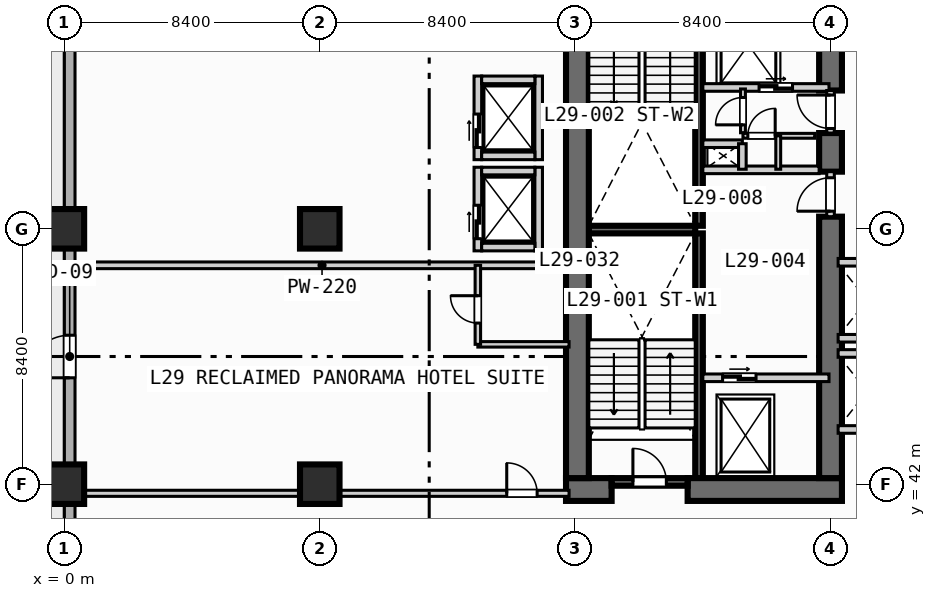
"""IFC4 building model, lengths in metres.
Left out: names, types, materials, properties, quantities, classifications, styles, units other than length and angle.
Written with IfcOpenShell. Run it as: python <this file> out.ifc"""

import sys

from ifc_helpers import new_model, si_unit, direction, frame, frame_2d, origin, origin_2d, place, context, subcontext, project, spatial, rectangle, extrude, element, fill, save


model = new_model("IFC4")
c1 = context("Model", 3, precision=1e-05, world=origin(), true_north=direction((0.0, 1.0)))
c2 = subcontext(c1, "Body", "Model", "MODEL_VIEW")
j1 = project(units=[si_unit("LENGTHUNIT", "METRE"), si_unit("PLANEANGLEUNIT", "RADIAN")], contexts=[c1])
p1 = place(None, origin())
s1 = spatial("IfcSite", under=j1, at=p1, CompositionType="ELEMENT")
p2 = place(p1, origin())
s2 = spatial("IfcBuilding", under=s1, at=p2, CompositionType="ELEMENT")
p3 = place(p2, frame((0.0, 0.0, 122.8)))
s3 = spatial("IfcBuildingStorey", under=s2, at=p3, CompositionType="ELEMENT", Elevation=122.8)
for number, where, z_axis, x_axis in (
    (1, (20.875, 42.2, 0.0), (0.0, 0.0, 1.0), (0.0, 1.0, 0.0)),
    (2, (20.875, 50.5, 0.0), (0.0, 0.0, 1.0), (0.0, 1.0, 0.0)),
):
    element("IfcWall", number, at=place(p3, frame(where, z_axis=z_axis, x_axis=x_axis)), inside=s3, PredefinedType="SOLIDWALL", context=c2, shape_type="SweptSolid", body=[
        extrude(rectangle(XDim=8.05, YDim=0.25, at=frame_2d((4.025, 0.0))), origin(), (0.0, 0.0, 1.0), 3.55),
    ])
p4 = place(p3, frame((17.25, 50.375, 0.0), z_axis=(0.0, 0.0, 1.0), x_axis=(1.0, 0.0, 0.0)))
e3 = element("IfcWall", 3, at=p4, inside=s3, PredefinedType="SOLIDWALL", context=c2, shape_type="SweptSolid", body=[
    extrude(rectangle(XDim=3.5, YDim=0.25, at=frame_2d((1.75, 0.0))), origin(), (0.0, 0.0, 1.0), 3.55),
])
p5 = place(p3, frame((16.5, 41.825, 0.0), z_axis=(0.0, 0.0, 1.0), x_axis=(1.0, 0.0, 0.0)))
e4 = element("IfcWall", 4, at=p5, inside=s3, PredefinedType="SHEAR", context=c2, shape_type="SweptSolid", body=[
    extrude(rectangle(XDim=1.5, YDim=0.75, at=frame_2d((0.75, 0.0))), origin(), (0.0, 0.0, 1.0), 3.55),
])
p6 = place(p3, frame((20.5, 41.825, 0.0), z_axis=(0.0, 0.0, 1.0), x_axis=(1.0, 0.0, 0.0)))
e5 = element("IfcWall", 5, at=p6, inside=s3, PredefinedType="SHEAR", context=c2, shape_type="SweptSolid", body=[
    extrude(rectangle(XDim=5.075, YDim=0.75, at=frame_2d((2.538, 0.0))), origin(), (0.0, 0.0, 1.0), 3.55),
])
p7 = place(p3, frame((16.875, 42.2, 0.0), z_axis=(0.0, 0.0, 1.0), x_axis=(0.0, 1.0, 0.0)))
e6 = element("IfcWall", 6, at=p7, inside=s3, PredefinedType="SHEAR", context=c2, shape_type="SweptSolid", body=[
    extrude(rectangle(XDim=16.35, YDim=0.75, at=frame_2d((8.175, 0.0))), origin(), (0.0, 0.0, 1.0), 3.55),
])
p8 = place(p3, frame((25.2, 42.2, 0.0), z_axis=(0.0, 0.0, 1.0), x_axis=(0.0, 1.0, 0.0)))
e7 = element("IfcWall", 7, at=p8, inside=s3, PredefinedType="SHEAR", context=c2, shape_type="SweptSolid", body=[
    extrude(rectangle(XDim=8.6, YDim=0.75, at=frame_2d((4.3, 0.0))), origin(), (0.0, 0.0, 1.0), 3.55),
])
p9 = place(p3, frame((25.2, 52.28, 0.0), z_axis=(0.0, 0.0, 1.0), x_axis=(0.0, 1.0, 0.0)))
e8 = element("IfcWall", 8, at=p9, inside=s3, PredefinedType="SHEAR", context=c2, shape_type="SweptSolid", body=[
    extrude(rectangle(XDim=1.27, YDim=0.75, at=frame_2d((0.635, 0.0))), origin(), (0.0, 0.0, 1.0), 3.55),
])
p10 = place(p3, frame((25.2, 54.95, 0.0), z_axis=(0.0, 0.0, 1.0), x_axis=(0.0, 1.0, 0.0)))
e9 = element("IfcWall", 9, at=p10, inside=s3, PredefinedType="SHEAR", context=c2, shape_type="SweptSolid", body=[
    extrude(rectangle(XDim=3.6, YDim=0.75, at=frame_2d((1.8, 0.0))), origin(), (0.0, 0.0, 1.0), 3.55),
])
for number, where, z_axis, x_axis in (
    (10, (0.0, 42.0, 0.0), (0.0, 0.0, 1.0), (1.0, 0.0, 0.0)),
    (11, (0.0, 50.4, 0.0), (0.0, 0.0, 1.0), (1.0, 0.0, 0.0)),
    (12, (8.4, 42.0, 0.0), (0.0, 0.0, 1.0), (1.0, 0.0, 0.0)),
    (13, (8.4, 50.4, 0.0), (0.0, 0.0, 1.0), (1.0, 0.0, 0.0)),
):
    element("IfcColumn", number, at=place(p3, frame(where, z_axis=z_axis, x_axis=x_axis)), inside=s3, PredefinedType="COLUMN", context=c2, shape_type="SweptSolid", body=[
        extrude(rectangle(XDim=1.3, YDim=1.3, at=origin_2d()), origin(), (0.0, 0.0, 1.0), 3.8),
    ])
p11 = place(p3, frame((0.175, 3.175, 0.0), z_axis=(0.0, 0.0, 1.0), x_axis=(0.0, 1.0, 0.0)))
e14 = element("IfcWall", 14, at=p11, inside=s3, PredefinedType="STANDARD", context=c2, shape_type="SweptSolid", body=[
    extrude(rectangle(XDim=86.05, YDim=0.35, at=frame_2d((43.025, 0.0))), origin(), (0.0, 0.0, 1.0), 3.55),
])
p12 = place(p11, frame((42.325, 0.0, 0.0)))
e15 = element("IfcOpeningElement", 15, at=p12, cuts=e14, PredefinedType="OPENING", context=c2, shape_type="SweptSolid", body=[
    extrude(rectangle(XDim=1.4, YDim=2.2, at=frame_2d((0.7, 1.1))), frame((0.0, 0.185, 0.0), z_axis=(0.0, -1.0, 0.0), x_axis=(1.0, 0.0, 0.0)), (0.0, 0.0, 1.0), 0.37),
])
p13 = place(p11, frame((33.525, 0.0, 0.85)))
e16 = element("IfcOpeningElement", 16, at=p13, cuts=e14, PredefinedType="OPENING", context=c2, shape_type="SweptSolid", body=[
    extrude(rectangle(XDim=2.2, YDim=1.8, at=frame_2d((1.1, 0.9))), frame((0.0, 0.185, 0.0), z_axis=(0.0, -1.0, 0.0), x_axis=(1.0, 0.0, 0.0)), (0.0, 0.0, 1.0), 0.37),
])
p14 = place(p11, frame((58.725, 0.0, 0.85)))
e17 = element("IfcOpeningElement", 17, at=p14, cuts=e14, PredefinedType="OPENING", context=c2, shape_type="SweptSolid", body=[
    extrude(rectangle(XDim=2.2, YDim=1.8, at=frame_2d((1.1, 0.9))), frame((0.0, 0.185, 0.0), z_axis=(0.0, -1.0, 0.0), x_axis=(1.0, 0.0, 0.0)), (0.0, 0.0, 1.0), 0.37),
])
p15 = place(p11, frame((65.125, 0.0, 0.85)))
e18 = element("IfcOpeningElement", 18, at=p15, cuts=e14, PredefinedType="OPENING", context=c2, shape_type="SweptSolid", body=[
    extrude(rectangle(XDim=1.8, YDim=1.8, at=frame_2d((0.9, 0.9))), frame((0.0, 0.185, 0.0), z_axis=(0.0, -1.0, 0.0), x_axis=(1.0, 0.0, 0.0)), (0.0, 0.0, 1.0), 0.37),
])
p16 = place(p11, frame((73.275, 0.0, 0.85)))
e19 = element("IfcOpeningElement", 19, at=p16, cuts=e14, PredefinedType="OPENING", context=c2, shape_type="SweptSolid", body=[
    extrude(rectangle(XDim=1.8, YDim=1.8, at=frame_2d((0.9, 0.9))), frame((0.0, 0.185, 0.0), z_axis=(0.0, -1.0, 0.0), x_axis=(1.0, 0.0, 0.0)), (0.0, 0.0, 1.0), 0.37),
])
p17 = place(p11, frame((81.625, 0.0, 0.85)))
e20 = element("IfcOpeningElement", 20, at=p17, cuts=e14, PredefinedType="OPENING", context=c2, shape_type="SweptSolid", body=[
    extrude(rectangle(XDim=1.8, YDim=1.8, at=frame_2d((0.9, 0.9))), frame((0.0, 0.185, 0.0), z_axis=(0.0, -1.0, 0.0), x_axis=(1.0, 0.0, 0.0)), (0.0, 0.0, 1.0), 0.37),
])
p18 = place(p3, frame((18.0, 42.075, 0.0), z_axis=(0.0, 0.0, 1.0), x_axis=(1.0, 0.0, 0.0)))
e21 = element("IfcWall", 21, at=p18, inside=s3, PredefinedType="SOLIDWALL", context=c2, shape_type="SweptSolid", body=[
    extrude(rectangle(XDim=2.5, YDim=0.25, at=frame_2d((1.25, 0.0))), origin(), (0.0, 0.0, 1.0), 3.55),
])
p19 = place(p18, frame((0.7, 0.0, 0.0)))
e22 = element("IfcOpeningElement", 22, at=p19, cuts=e21, PredefinedType="OPENING", context=c2, shape_type="SweptSolid", body=[
    extrude(rectangle(XDim=1.1, YDim=2.15, at=frame_2d((0.55, 1.075))), frame((0.0, 0.135, 0.0), z_axis=(0.0, -1.0, 0.0), x_axis=(1.0, 0.0, 0.0)), (0.0, 0.0, 1.0), 0.27),
])
p20 = place(p3, frame((21.0, 45.5, 0.0), z_axis=(0.0, 0.0, 1.0), x_axis=(1.0, 0.0, 0.0)))
e23 = element("IfcWall", 23, at=p20, inside=s3, PredefinedType="SOLIDWALL", context=c2, shape_type="SweptSolid", body=[
    extrude(rectangle(XDim=4.15, YDim=0.25, at=frame_2d((2.075, 0.0))), origin(), (0.0, 0.0, 1.0), 3.55),
])
p21 = place(p20, frame((0.65, 0.0, 0.0)))
e24 = element("IfcOpeningElement", 24, at=p21, cuts=e23, PredefinedType="OPENING", context=c2, shape_type="SweptSolid", body=[
    extrude(rectangle(XDim=1.1, YDim=2.15, at=frame_2d((0.55, 1.075))), frame((0.0, 0.135, 0.0), z_axis=(0.0, -1.0, 0.0), x_axis=(1.0, 0.0, 0.0)), (0.0, 0.0, 1.0), 0.27),
])
p22 = place(p3, frame((25.2, 50.8, 0.0), z_axis=(0.0, 0.0, 1.0), x_axis=(0.0, 1.0, 0.0)))
e25 = element("IfcWall", 25, at=p22, inside=s3, PredefinedType="SOLIDWALL", context=c2, shape_type="SweptSolid", body=[
    extrude(rectangle(XDim=1.48, YDim=0.25, at=frame_2d((0.74, 0.0))), origin(), (0.0, 0.0, 1.0), 3.55),
])
p23 = place(p22, frame((0.18, 0.0, 0.0)))
e26 = element("IfcOpeningElement", 26, at=p23, cuts=e25, PredefinedType="OPENING", context=c2, shape_type="SweptSolid", body=[
    extrude(rectangle(XDim=1.1, YDim=2.15, at=frame_2d((0.55, 1.075))), frame((0.0, 0.135, 0.0), z_axis=(0.0, -1.0, 0.0), x_axis=(1.0, 0.0, 0.0)), (0.0, 0.0, 1.0), 0.27),
])
p24 = place(p3, frame((21.0, 52.34, 0.0), z_axis=(0.0, 0.0, 1.0), x_axis=(1.0, 0.0, 0.0)))
e27 = element("IfcWall", 27, at=p24, inside=s3, PredefinedType="SOLIDWALL", context=c2, shape_type="SweptSolid", body=[
    extrude(rectangle(XDim=3.825, YDim=0.25, at=frame_2d((1.913, 0.0))), origin(), (0.0, 0.0, 1.0), 3.55),
])
p25 = place(p3, frame((21.0, 55.05, 0.0), z_axis=(0.0, 0.0, 1.0), x_axis=(1.0, 0.0, 0.0)))
e28 = element("IfcWall", 28, at=p25, inside=s3, PredefinedType="SOLIDWALL", context=c2, shape_type="SweptSolid", body=[
    extrude(rectangle(XDim=4.15, YDim=0.25, at=frame_2d((2.075, 0.0))), origin(), (0.0, 0.0, 1.0), 3.55),
])
p26 = place(p25, frame((1.85, 0.0, 0.0)))
e29 = element("IfcOpeningElement", 29, at=p26, cuts=e28, PredefinedType="OPENING", context=c2, shape_type="SweptSolid", body=[
    extrude(rectangle(XDim=1.1, YDim=2.15, at=frame_2d((0.55, 1.075))), frame((0.0, 0.135, 0.0), z_axis=(0.0, -1.0, 0.0), x_axis=(1.0, 0.0, 0.0)), (0.0, 0.0, 1.0), 0.27),
])
p27 = place(p3, frame((25.2, 53.55, 0.0), z_axis=(0.0, 0.0, 1.0), x_axis=(0.0, 1.0, 0.0)))
e30 = element("IfcWall", 30, at=p27, inside=s3, PredefinedType="SOLIDWALL", context=c2, shape_type="SweptSolid", body=[
    extrude(rectangle(XDim=1.4, YDim=0.25, at=frame_2d((0.7, 0.0))), origin(), (0.0, 0.0, 1.0), 3.55),
])
p28 = place(p27, frame((0.15, 0.0, 0.0)))
e31 = element("IfcOpeningElement", 31, at=p28, cuts=e30, PredefinedType="OPENING", context=c2, shape_type="SweptSolid", body=[
    extrude(rectangle(XDim=1.1, YDim=2.15, at=frame_2d((0.55, 1.075))), frame((0.0, 0.135, 0.0), z_axis=(0.0, -1.0, 0.0), x_axis=(1.0, 0.0, 0.0)), (0.0, 0.0, 1.0), 0.27),
])
p29 = place(p3, frame((21.0, 53.2, 0.0), z_axis=(0.0, 0.0, 1.0), x_axis=(1.0, 0.0, 0.0)))
e32 = element("IfcWall", 32, at=p29, inside=s3, PredefinedType="SOLIDWALL", context=c2, shape_type="SweptSolid", body=[
    extrude(rectangle(XDim=1.3, YDim=0.25, at=frame_2d((0.65, 0.0))), origin(), (0.0, 0.0, 1.0), 3.55),
])
p30 = place(p3, frame((22.3, 52.36, 0.0), z_axis=(0.0, 0.0, 1.0), x_axis=(0.0, 1.0, 0.0)))
e33 = element("IfcWall", 33, at=p30, inside=s3, PredefinedType="SOLIDWALL", context=c2, shape_type="SweptSolid", body=[
    extrude(rectangle(XDim=0.84, YDim=0.25, at=frame_2d((0.42, 0.0))), origin(), (0.0, 0.0, 1.0), 3.55),
])
p31 = place(p3, frame((22.32, 53.56, 0.0), z_axis=(0.0, 0.0, 1.0), x_axis=(0.0, 1.0, 0.0)))
e34 = element("IfcWall", 34, at=p31, inside=s3, PredefinedType="PARTITIONING", context=c2, shape_type="SweptSolid", body=[
    extrude(rectangle(XDim=1.44, YDim=0.16, at=frame_2d((0.72, 0.0))), origin(), (0.0, 0.0, 1.0), 3.55),
])
p32 = place(p31, frame((0.26, 0.0, 0.0)))
e35 = element("IfcOpeningElement", 35, at=p32, cuts=e34, PredefinedType="OPENING", context=c2, shape_type="SweptSolid", body=[
    extrude(rectangle(XDim=0.9, YDim=2.1, at=frame_2d((0.45, 1.05))), frame((0.0, 0.09, 0.0), z_axis=(0.0, -1.0, 0.0), x_axis=(1.0, 0.0, 0.0)), (0.0, 0.0, 1.0), 0.18),
])
p33 = place(p3, frame((22.32, 53.46, 0.0), z_axis=(0.0, 0.0, 1.0), x_axis=(1.0, 0.0, 0.0)))
e36 = element("IfcWall", 36, at=p33, inside=s3, PredefinedType="PARTITIONING", context=c2, shape_type="SweptSolid", body=[
    extrude(rectangle(XDim=2.36, YDim=0.16, at=frame_2d((1.18, 0.0))), origin(), (0.0, 0.0, 1.0), 3.55),
])
p34 = place(p33, frame((0.16, 0.0, 0.0)))
e37 = element("IfcOpeningElement", 37, at=p34, cuts=e36, PredefinedType="OPENING", context=c2, shape_type="SweptSolid", body=[
    extrude(rectangle(XDim=0.9, YDim=2.1, at=frame_2d((0.45, 1.05))), frame((0.0, 0.09, 0.0), z_axis=(0.0, -1.0, 0.0), x_axis=(1.0, 0.0, 0.0)), (0.0, 0.0, 1.0), 0.18),
])
p35 = place(p3, frame((23.48, 52.36, 0.0), z_axis=(0.0, 0.0, 1.0), x_axis=(0.0, 1.0, 0.0)))
e38 = element("IfcWall", 38, at=p35, inside=s3, PredefinedType="PARTITIONING", context=c2, shape_type="SweptSolid", body=[
    extrude(rectangle(XDim=1.1, YDim=0.16, at=frame_2d((0.55, 0.0))), origin(), (0.0, 0.0, 1.0), 3.55),
])
p36 = place(p3, frame((13.6, 49.675, 0.0), z_axis=(0.0, 0.0, 1.0), x_axis=(0.0, 1.0, 0.0)))
e39 = element("IfcWall", 39, at=p36, inside=s3, PredefinedType="SOLIDWALL", context=c2, shape_type="SweptSolid", body=[
    extrude(rectangle(XDim=2.75, YDim=0.25, at=frame_2d((1.375, 0.0))), origin(), (0.0, 0.0, 1.0), 3.55),
])
p37 = place(p36, frame((0.4, 0.0, 0.0)))
e40 = element("IfcOpeningElement", 40, at=p37, cuts=e39, PredefinedType="OPENING", context=c2, shape_type="SweptSolid", body=[
    extrude(rectangle(XDim=1.1, YDim=2.15, at=frame_2d((0.55, 1.075))), frame((0.0, 0.135, 0.0), z_axis=(0.0, -1.0, 0.0), x_axis=(1.0, 0.0, 0.0)), (0.0, 0.0, 1.0), 0.27),
])
p38 = place(p3, frame((15.6, 49.675, 0.0), z_axis=(0.0, 0.0, 1.0), x_axis=(0.0, 1.0, 0.0)))
e41 = element("IfcWall", 41, at=p38, inside=s3, PredefinedType="SOLIDWALL", context=c2, shape_type="SweptSolid", body=[
    extrude(rectangle(XDim=2.75, YDim=0.25, at=frame_2d((1.375, 0.0))), origin(), (0.0, 0.0, 1.0), 3.55),
])
for number, where, z_axis, x_axis in (
    (42, (13.725, 49.8, 0.0), (0.0, 0.0, 1.0), (1.0, 0.0, 0.0)),
    (43, (13.725, 52.3, 0.0), (0.0, 0.0, 1.0), (1.0, 0.0, 0.0)),
):
    element("IfcWall", number, at=place(p3, frame(where, z_axis=z_axis, x_axis=x_axis)), inside=s3, PredefinedType="SOLIDWALL", context=c2, shape_type="SweptSolid", body=[
        extrude(rectangle(XDim=1.75, YDim=0.25, at=frame_2d((0.875, 0.0))), origin(), (0.0, 0.0, 1.0), 3.55),
    ])
p39 = place(p3, frame((13.6, 52.675, 0.0), z_axis=(0.0, 0.0, 1.0), x_axis=(0.0, 1.0, 0.0)))
e44 = element("IfcWall", 44, at=p39, inside=s3, PredefinedType="SOLIDWALL", context=c2, shape_type="SweptSolid", body=[
    extrude(rectangle(XDim=2.75, YDim=0.25, at=frame_2d((1.375, 0.0))), origin(), (0.0, 0.0, 1.0), 3.55),
])
p40 = place(p39, frame((0.4, 0.0, 0.0)))
e45 = element("IfcOpeningElement", 45, at=p40, cuts=e44, PredefinedType="OPENING", context=c2, shape_type="SweptSolid", body=[
    extrude(rectangle(XDim=1.1, YDim=2.15, at=frame_2d((0.55, 1.075))), frame((0.0, 0.135, 0.0), z_axis=(0.0, -1.0, 0.0), x_axis=(1.0, 0.0, 0.0)), (0.0, 0.0, 1.0), 0.27),
])
p41 = place(p3, frame((15.6, 52.675, 0.0), z_axis=(0.0, 0.0, 1.0), x_axis=(0.0, 1.0, 0.0)))
e46 = element("IfcWall", 46, at=p41, inside=s3, PredefinedType="SOLIDWALL", context=c2, shape_type="SweptSolid", body=[
    extrude(rectangle(XDim=2.75, YDim=0.25, at=frame_2d((1.375, 0.0))), origin(), (0.0, 0.0, 1.0), 3.55),
])
for number, where, z_axis, x_axis in (
    (47, (13.725, 52.8, 0.0), (0.0, 0.0, 1.0), (1.0, 0.0, 0.0)),
    (48, (13.725, 55.3, 0.0), (0.0, 0.0, 1.0), (1.0, 0.0, 0.0)),
):
    element("IfcWall", number, at=place(p3, frame(where, z_axis=z_axis, x_axis=x_axis)), inside=s3, PredefinedType="SOLIDWALL", context=c2, shape_type="SweptSolid", body=[
        extrude(rectangle(XDim=1.75, YDim=0.25, at=frame_2d((0.875, 0.0))), origin(), (0.0, 0.0, 1.0), 3.55),
    ])
for number, where, z_axis, x_axis in (
    (49, (25.45, 43.8, 0.0), (0.0, 0.0, 1.0), (1.0, 0.0, 0.0)),
    (50, (25.45, 46.3, 0.0), (0.0, 0.0, 1.0), (1.0, 0.0, 0.0)),
    (51, (25.45, 46.8, 0.0), (0.0, 0.0, 1.0), (1.0, 0.0, 0.0)),
    (52, (25.45, 49.3, 0.0), (0.0, 0.0, 1.0), (1.0, 0.0, 0.0)),
):
    element("IfcWall", number, at=place(p3, frame(where, z_axis=z_axis, x_axis=x_axis)), inside=s3, PredefinedType="SOLIDWALL", context=c2, shape_type="SweptSolid", body=[
        extrude(rectangle(XDim=1.825, YDim=0.25, at=frame_2d((0.913, 0.0))), origin(), (0.0, 0.0, 1.0), 3.55),
    ])
p42 = place(p3, frame((0.35, 41.7, 0.0), z_axis=(0.0, 0.0, 1.0), x_axis=(1.0, 0.0, 0.0)))
e53 = element("IfcWall", 53, at=p42, inside=s3, PredefinedType="PARTITIONING", context=c2, shape_type="SweptSolid", body=[
    extrude(rectangle(XDim=16.25, YDim=0.2, at=frame_2d((8.125, 0.0))), origin(), (0.0, 0.0, 1.0), 2.8),
])
p43 = place(p42, frame((14.2, 0.0, 0.0)))
e54 = element("IfcOpeningElement", 54, at=p43, cuts=e53, PredefinedType="OPENING", context=c2, shape_type="SweptSolid", body=[
    extrude(rectangle(XDim=1.0, YDim=2.15, at=frame_2d((0.5, 1.075))), frame((0.0, 0.11, 0.0), z_axis=(0.0, -1.0, 0.0), x_axis=(1.0, 0.0, 0.0)), (0.0, 0.0, 1.0), 0.22),
])
p44 = place(p3, frame((0.35, 49.2, 0.0), z_axis=(0.0, 0.0, 1.0), x_axis=(1.0, 0.0, 0.0)))
e55 = element("IfcWall", 55, at=p44, inside=s3, PredefinedType="PARTITIONING", context=c2, shape_type="SweptSolid", body=[
    extrude(rectangle(XDim=16.25, YDim=0.22, at=frame_2d((8.125, 0.0))), origin(), (0.0, 0.0, 1.0), 3.55),
])
p45 = place(p3, frame((13.6, 46.6, 0.0), z_axis=(0.0, 0.0, 1.0), x_axis=(1.0, 0.0, 0.0)))
e56 = element("IfcWall", 56, at=p45, inside=s3, PredefinedType="PLUMBINGWALL", context=c2, shape_type="SweptSolid", body=[
    extrude(rectangle(XDim=3.0, YDim=0.18, at=frame_2d((1.5, 0.0))), origin(), (0.0, 0.0, 1.0), 3.55),
])
p46 = place(p3, frame((13.6, 46.6, 0.0), z_axis=(0.0, 0.0, 1.0), x_axis=(0.0, 1.0, 0.0)))
e57 = element("IfcWall", 57, at=p46, inside=s3, PredefinedType="PLUMBINGWALL", context=c2, shape_type="SweptSolid", body=[
    extrude(rectangle(XDim=2.6, YDim=0.18, at=frame_2d((1.3, 0.0))), origin(), (0.0, 0.0, 1.0), 3.55),
])
p47 = place(p46, frame((0.7, 0.0, 0.0)))
e58 = element("IfcOpeningElement", 58, at=p47, cuts=e57, PredefinedType="OPENING", context=c2, shape_type="SweptSolid", body=[
    extrude(rectangle(XDim=0.9, YDim=2.1, at=frame_2d((0.45, 1.05))), frame((0.0, 0.1, 0.0), z_axis=(0.0, -1.0, 0.0), x_axis=(1.0, 0.0, 0.0)), (0.0, 0.0, 1.0), 0.2),
])
p48 = place(p12, origin())
e59 = element("IfcDoor", 59, at=p48, inside=s3, OperationType="SINGLE_SWING_LEFT", PredefinedType="DOOR", context=c2, shape_type="SweptSolid", body=[
    extrude(rectangle(XDim=1.4, YDim=2.2, at=frame_2d((0.7, 1.1))), frame((0.0, 0.025, 0.0), z_axis=(0.0, -1.0, 0.0), x_axis=(1.0, 0.0, 0.0)), (0.0, 0.0, 1.0), 0.05),
])
fill(e15, e59)
p49 = place(p19, origin())
e60 = element("IfcDoor", 60, at=p49, inside=s3, OperationType="SINGLE_SWING_LEFT", PredefinedType="DOOR", context=c2, shape_type="SweptSolid", body=[
    extrude(rectangle(XDim=1.1, YDim=2.15, at=frame_2d((0.55, 1.075))), frame((0.0, 0.025, 0.0), z_axis=(0.0, -1.0, 0.0), x_axis=(1.0, 0.0, 0.0)), (0.0, 0.0, 1.0), 0.05),
])
fill(e22, e60)
p50 = place(p21, origin())
e61 = element("IfcDoor", 61, at=p50, inside=s3, OperationType="SLIDING_TO_LEFT", PredefinedType="DOOR", context=c2, shape_type="SweptSolid", body=[
    extrude(rectangle(XDim=1.1, YDim=2.15, at=frame_2d((0.55, 1.075))), frame((0.0, 0.025, 0.0), z_axis=(0.0, -1.0, 0.0), x_axis=(1.0, 0.0, 0.0)), (0.0, 0.0, 1.0), 0.05),
])
fill(e24, e61)
p51 = place(p23, origin())
e62 = element("IfcDoor", 62, at=p51, inside=s3, OperationType="SINGLE_SWING_LEFT", PredefinedType="DOOR", context=c2, shape_type="SweptSolid", body=[
    extrude(rectangle(XDim=1.1, YDim=2.15, at=frame_2d((0.55, 1.075))), frame((0.0, 0.025, 0.0), z_axis=(0.0, -1.0, 0.0), x_axis=(1.0, 0.0, 0.0)), (0.0, 0.0, 1.0), 0.05),
])
fill(e26, e62)
p52 = place(p26, origin())
e63 = element("IfcDoor", 63, at=p52, inside=s3, OperationType="SLIDING_TO_LEFT", PredefinedType="DOOR", context=c2, shape_type="SweptSolid", body=[
    extrude(rectangle(XDim=1.1, YDim=2.15, at=frame_2d((0.55, 1.075))), frame((0.0, 0.025, 0.0), z_axis=(0.0, -1.0, 0.0), x_axis=(1.0, 0.0, 0.0)), (0.0, 0.0, 1.0), 0.05),
])
fill(e29, e63)
p53 = place(p28, origin())
e64 = element("IfcDoor", 64, at=p53, inside=s3, OperationType="SINGLE_SWING_RIGHT", PredefinedType="DOOR", context=c2, shape_type="SweptSolid", body=[
    extrude(rectangle(XDim=1.1, YDim=2.15, at=frame_2d((0.55, 1.075))), frame((0.0, 0.025, 0.0), z_axis=(0.0, -1.0, 0.0), x_axis=(1.0, 0.0, 0.0)), (0.0, 0.0, 1.0), 0.05),
])
fill(e31, e64)
p54 = place(p32, origin())
e65 = element("IfcDoor", 65, at=p54, inside=s3, OperationType="SINGLE_SWING_LEFT", PredefinedType="DOOR", context=c2, shape_type="SweptSolid", body=[
    extrude(rectangle(XDim=0.9, YDim=2.1, at=frame_2d((0.45, 1.05))), frame((0.0, 0.025, 0.0), z_axis=(0.0, -1.0, 0.0), x_axis=(1.0, 0.0, 0.0)), (0.0, 0.0, 1.0), 0.05),
])
fill(e35, e65)
p55 = place(p34, origin())
e66 = element("IfcDoor", 66, at=p55, inside=s3, OperationType="SINGLE_SWING_RIGHT", PredefinedType="DOOR", context=c2, shape_type="SweptSolid", body=[
    extrude(rectangle(XDim=0.9, YDim=2.1, at=frame_2d((0.45, 1.05))), frame((0.0, 0.025, 0.0), z_axis=(0.0, -1.0, 0.0), x_axis=(1.0, 0.0, 0.0)), (0.0, 0.0, 1.0), 0.05),
])
fill(e37, e66)
p56 = place(p37, origin())
e67 = element("IfcDoor", 67, at=p56, inside=s3, OperationType="SLIDING_TO_LEFT", PredefinedType="DOOR", context=c2, shape_type="SweptSolid", body=[
    extrude(rectangle(XDim=1.1, YDim=2.15, at=frame_2d((0.55, 1.075))), frame((0.0, 0.025, 0.0), z_axis=(0.0, -1.0, 0.0), x_axis=(1.0, 0.0, 0.0)), (0.0, 0.0, 1.0), 0.05),
])
fill(e40, e67)
p57 = place(p40, origin())
e68 = element("IfcDoor", 68, at=p57, inside=s3, OperationType="SLIDING_TO_LEFT", PredefinedType="DOOR", context=c2, shape_type="SweptSolid", body=[
    extrude(rectangle(XDim=1.1, YDim=2.15, at=frame_2d((0.55, 1.075))), frame((0.0, 0.025, 0.0), z_axis=(0.0, -1.0, 0.0), x_axis=(1.0, 0.0, 0.0)), (0.0, 0.0, 1.0), 0.05),
])
fill(e45, e68)
p58 = place(p43, origin())
e69 = element("IfcDoor", 69, at=p58, inside=s3, OperationType="SINGLE_SWING_LEFT", PredefinedType="DOOR", context=c2, shape_type="SweptSolid", body=[
    extrude(rectangle(XDim=1.0, YDim=2.15, at=frame_2d((0.5, 1.075))), frame((0.0, 0.025, 0.0), z_axis=(0.0, -1.0, 0.0), x_axis=(1.0, 0.0, 0.0)), (0.0, 0.0, 1.0), 0.05),
])
fill(e54, e69)
p59 = place(p47, origin())
e70 = element("IfcDoor", 70, at=p59, inside=s3, OperationType="SINGLE_SWING_RIGHT", PredefinedType="DOOR", context=c2, shape_type="SweptSolid", body=[
    extrude(rectangle(XDim=0.9, YDim=2.1, at=frame_2d((0.45, 1.05))), frame((0.0, 0.025, 0.0), z_axis=(0.0, -1.0, 0.0), x_axis=(1.0, 0.0, 0.0)), (0.0, 0.0, 1.0), 0.05),
])
fill(e58, e70)
save(model, sys.argv[1])
